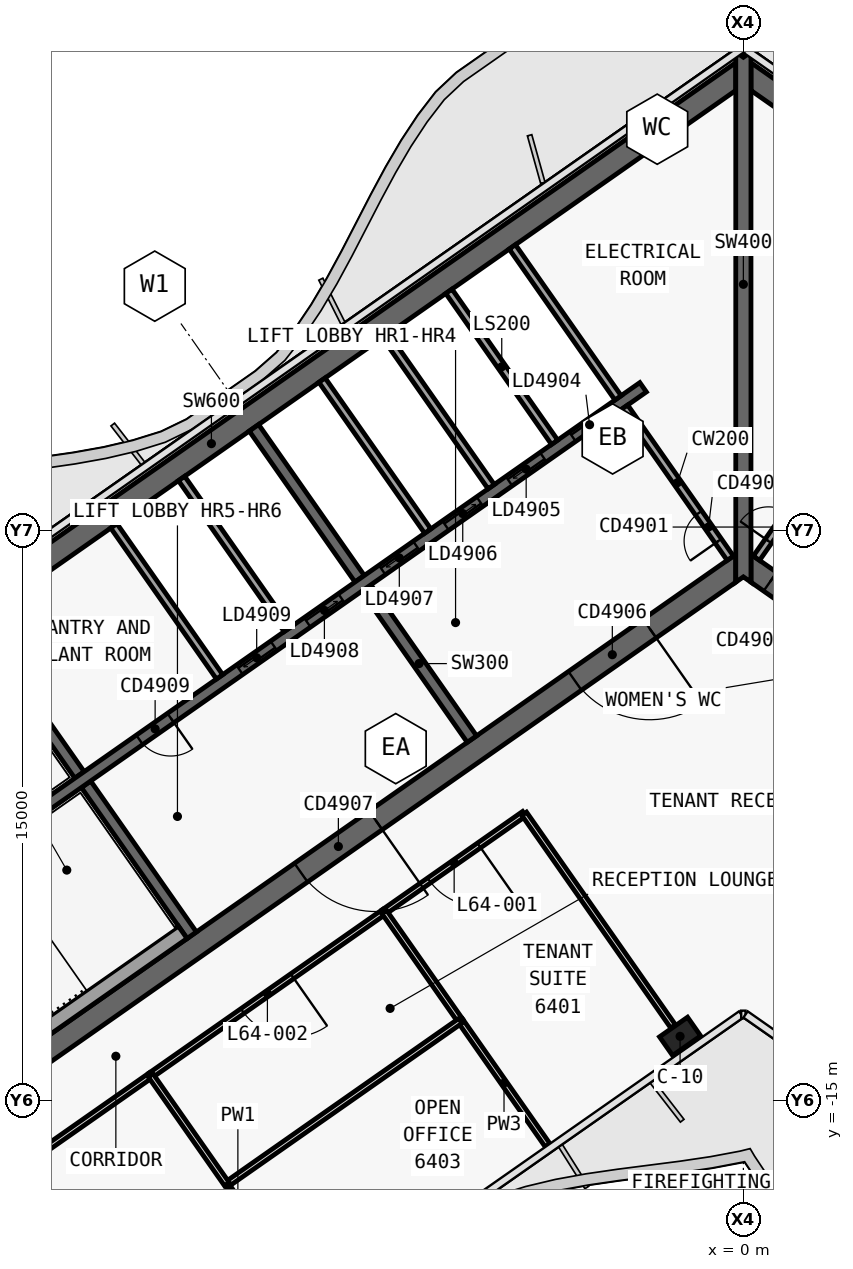
"""IFC4 building model, lengths in metres.
Left out: names, types, materials, properties, quantities, classifications, styles, units other than length and angle.
Written with IfcOpenShell. Run it as: python <this file> out.ifc"""

import sys

from ifc_helpers import new_model, si_unit, direction, frame, frame_2d, origin, origin_2d, place, context, subcontext, project, spatial, polyline, rectangle, outline, extrude, element, fill, save


model = new_model("IFC4")
c1 = context("Model", 3, precision=1e-05, world=origin(), true_north=direction((0.0, 1.0)))
c2 = subcontext(c1, "Body", "Model", "MODEL_VIEW")
j1 = project(units=[si_unit("LENGTHUNIT", "METRE"), si_unit("PLANEANGLEUNIT", "RADIAN")], contexts=[c1])
p1 = place(None, origin())
s1 = spatial("IfcSite", under=j1, at=p1, CompositionType="ELEMENT")
p2 = place(p1, origin())
s2 = spatial("IfcBuilding", under=s1, at=p2, CompositionType="ELEMENT")
p3 = place(p2, frame((0.0, 0.0, 272.2)))
s3 = spatial("IfcBuildingStorey", under=s2, at=p3, CompositionType="ELEMENT", Elevation=272.2)
p4 = place(p3, frame((-0.028, 12.066, 0.0), z_axis=(0.0, 0.0, 1.0), x_axis=(-0.819151382952, -0.573577380837, 0.0)))
e1 = element("IfcWall", 1, at=p4, inside=s3, PredefinedType="SHEAR", context=c2, shape_type="SweptSolid", body=[
    extrude(outline(polyline([(33.898, 0.3), (0.42, 0.3), (0.0, -0.3), (33.898, -0.3), (33.898, 0.3)])), origin(), (0.0, 0.0, 1.0), 3.9),
])
p5 = place(p3, frame((-0.028, -0.874, 0.0), z_axis=(0.0, 0.0, 1.0), x_axis=(-0.819150035022, -0.573579305871, 0.0)))
e2 = element("IfcWall", 2, at=p5, inside=s3, PredefinedType="SHEAR", context=c2, shape_type="SweptSolid", body=[
    extrude(outline(polyline([(26.476, 0.3), (0.42, 0.3), (0.0, -0.3), (26.476, -0.3), (26.476, 0.3)])), origin(), (0.0, 0.0, 1.0), 3.9),
])
p6 = place(p5, frame((2.976, 0.0, 0.0)))
e3 = element("IfcOpeningElement", 3, at=p6, cuts=e2, PredefinedType="OPENING", context=c2, shape_type="SweptSolid", body=[
    extrude(rectangle(XDim=2.4, YDim=2.1, at=frame_2d((1.2, 1.05))), frame((0.0, 0.31, 0.0), z_axis=(0.0, -1.0, 0.0), x_axis=(1.0, 0.0, 0.0)), (0.0, 0.0, 1.0), 0.62),
])
p7 = place(p5, frame((11.776, 0.0, 0.0)))
e4 = element("IfcOpeningElement", 4, at=p7, cuts=e2, PredefinedType="OPENING", context=c2, shape_type="SweptSolid", body=[
    extrude(rectangle(XDim=2.4, YDim=2.1, at=frame_2d((1.2, 1.05))), frame((0.0, 0.31, 0.0), z_axis=(0.0, -1.0, 0.0), x_axis=(1.0, 0.0, 0.0)), (0.0, 0.0, 1.0), 0.62),
])
p8 = place(p3, frame((-7.143, -5.49, 0.0), z_axis=(0.0, 0.0, 1.0), x_axis=(-0.573617744349, 0.819123118565, 0.0)))
e5 = element("IfcWall", 5, at=p8, inside=s3, PredefinedType="SHEAR", context=c2, shape_type="SweptSolid", body=[
    extrude(outline(polyline([(4.85, 0.15), (0.0, 0.15), (0.0, -0.15), (4.85, -0.15), (4.85, 0.15)])), origin(), (0.0, 0.0, 1.0), 3.9),
])
p9 = place(p3, frame((-10.097, -1.271, 0.0), z_axis=(0.0, 0.0, 1.0), x_axis=(-0.573560315113, 0.819163332265, 0.0)))
e6 = element("IfcWall", 6, at=p9, inside=s3, PredefinedType="SHEAR", context=c2, shape_type="SweptSolid", body=[
    extrude(outline(polyline([(4.85, -0.15), (4.85, 0.15), (0.0, 0.15), (0.0, -0.15), (4.85, -0.15)])), origin(), (0.0, 0.0, 1.0), 3.9),
])
p10 = place(p3, frame((-14.515, -10.652, 0.0), z_axis=(0.0, 0.0, 1.0), x_axis=(-0.573560315113, 0.819163332265, 0.0)))
e7 = element("IfcWall", 7, at=p10, inside=s3, PredefinedType="SHEAR", context=c2, shape_type="SweptSolid", body=[
    extrude(outline(polyline([(4.85, 0.15), (0.0, 0.15), (0.0, -0.15), (4.85, -0.15), (4.85, 0.15)])), origin(), (0.0, 0.0, 1.0), 3.9),
])
p11 = place(p3, frame((-17.469, -6.433, 0.0), z_axis=(0.0, 0.0, 1.0), x_axis=(-0.573594092424, 0.81913968109, 0.0)))
e8 = element("IfcWall", 8, at=p11, inside=s3, PredefinedType="SHEAR", context=c2, shape_type="SweptSolid", body=[
    extrude(outline(polyline([(4.85, -0.15), (4.85, 0.15), (0.0, 0.15), (0.0, -0.15), (4.85, -0.15)])), origin(), (0.0, 0.0, 1.0), 3.9),
])
p12 = place(p3, frame((-2.638, 3.768, 0.0), z_axis=(0.0, 0.0, 1.0), x_axis=(-0.819155014212, -0.573572194837, 0.0)))
e9 = element("IfcWall", 9, at=p12, inside=s3, PredefinedType="SHEAR", context=c2, shape_type="SweptSolid", body=[
    extrude(outline(polyline([(26.4, 0.15), (0.0, 0.15), (0.0, -0.15), (26.4, -0.15), (26.4, 0.15)])), origin(), (0.0, 0.0, 1.0), 3.9),
])
p13 = place(p12, frame((1.169, 0.0, 0.0)))
e10 = element("IfcOpeningElement", 10, at=p13, cuts=e9, PredefinedType="OPENING", context=c2, shape_type="SweptSolid", body=[
    extrude(rectangle(XDim=1.1, YDim=2.1, at=frame_2d((0.55, 1.05))), frame((0.0, 0.16, 0.0), z_axis=(0.0, -1.0, 0.0), x_axis=(1.0, 0.0, 0.0)), (0.0, 0.0, 1.0), 0.32),
])
p14 = place(p12, frame((3.206, 0.0, 0.0)))
e11 = element("IfcOpeningElement", 11, at=p14, cuts=e9, PredefinedType="OPENING", context=c2, shape_type="SweptSolid", body=[
    extrude(rectangle(XDim=1.1, YDim=2.1, at=frame_2d((0.55, 1.05))), frame((0.0, 0.16, 0.0), z_axis=(0.0, -1.0, 0.0), x_axis=(1.0, 0.0, 0.0)), (0.0, 0.0, 1.0), 0.32),
])
p15 = place(p12, frame((5.244, 0.0, 0.0)))
e12 = element("IfcOpeningElement", 12, at=p15, cuts=e9, PredefinedType="OPENING", context=c2, shape_type="SweptSolid", body=[
    extrude(rectangle(XDim=1.1, YDim=2.1, at=frame_2d((0.55, 1.05))), frame((0.0, 0.16, 0.0), z_axis=(0.0, -1.0, 0.0), x_axis=(1.0, 0.0, 0.0)), (0.0, 0.0, 1.0), 0.32),
])
p16 = place(p12, frame((7.281, 0.0, 0.0)))
e13 = element("IfcOpeningElement", 13, at=p16, cuts=e9, PredefinedType="OPENING", context=c2, shape_type="SweptSolid", body=[
    extrude(rectangle(XDim=1.1, YDim=2.1, at=frame_2d((0.55, 1.05))), frame((0.0, 0.16, 0.0), z_axis=(0.0, -1.0, 0.0), x_axis=(1.0, 0.0, 0.0)), (0.0, 0.0, 1.0), 0.32),
])
p17 = place(p12, frame((9.688, 0.0, 0.0)))
e14 = element("IfcOpeningElement", 14, at=p17, cuts=e9, PredefinedType="OPENING", context=c2, shape_type="SweptSolid", body=[
    extrude(rectangle(XDim=1.1, YDim=2.1, at=frame_2d((0.55, 1.05))), frame((0.0, 0.16, 0.0), z_axis=(0.0, -1.0, 0.0), x_axis=(1.0, 0.0, 0.0)), (0.0, 0.0, 1.0), 0.32),
])
p18 = place(p12, frame((11.863, 0.0, 0.0)))
e15 = element("IfcOpeningElement", 15, at=p18, cuts=e9, PredefinedType="OPENING", context=c2, shape_type="SweptSolid", body=[
    extrude(rectangle(XDim=1.1, YDim=2.1, at=frame_2d((0.55, 1.05))), frame((0.0, 0.16, 0.0), z_axis=(0.0, -1.0, 0.0), x_axis=(1.0, 0.0, 0.0)), (0.0, 0.0, 1.0), 0.32),
])
p19 = place(p12, frame((15.175, 0.0, 0.0)))
e16 = element("IfcOpeningElement", 16, at=p19, cuts=e9, PredefinedType="OPENING", context=c2, shape_type="SweptSolid", body=[
    extrude(rectangle(XDim=1.0, YDim=2.1, at=frame_2d((0.5, 1.05))), frame((0.0, 0.16, 0.0), z_axis=(0.0, -1.0, 0.0), x_axis=(1.0, 0.0, 0.0)), (0.0, 0.0, 1.0), 0.32),
])
p20 = place(p3, frame((0.028, 12.066, 0.0), z_axis=(0.0, 0.0, 1.0), x_axis=(0.819151382952, -0.573577380837, 0.0)))
e17 = element("IfcWall", 17, at=p20, inside=s3, PredefinedType="SHEAR", context=c2, shape_type="SweptSolid", body=[
    extrude(outline(polyline([(33.898, 0.3), (0.0, 0.3), (0.42, -0.3), (33.898, -0.3), (33.898, 0.3)])), origin(), (0.0, 0.0, 1.0), 3.9),
])
p21 = place(p3, frame((0.028, -0.874, 0.0), z_axis=(0.0, 0.0, 1.0), x_axis=(0.819150035022, -0.573579305871, 0.0)))
e18 = element("IfcWall", 18, at=p21, inside=s3, PredefinedType="SHEAR", context=c2, shape_type="SweptSolid", body=[
    extrude(outline(polyline([(26.476, 0.3), (0.0, 0.3), (0.42, -0.3), (26.476, -0.3), (26.476, 0.3)])), origin(), (0.0, 0.0, 1.0), 3.9),
])
p22 = place(p21, frame((0.826, 0.0, 0.0)))
e19 = element("IfcOpeningElement", 19, at=p22, cuts=e18, PredefinedType="OPENING", context=c2, shape_type="SweptSolid", body=[
    extrude(rectangle(XDim=1.5, YDim=2.1, at=frame_2d((0.75, 1.05))), frame((0.0, 0.31, 0.0), z_axis=(0.0, -1.0, 0.0), x_axis=(1.0, 0.0, 0.0)), (0.0, 0.0, 1.0), 0.62),
])
p23 = place(p21, frame((12.226, 0.0, 0.0)))
e20 = element("IfcOpeningElement", 20, at=p23, cuts=e18, PredefinedType="OPENING", context=c2, shape_type="SweptSolid", body=[
    extrude(rectangle(XDim=1.5, YDim=2.1, at=frame_2d((0.75, 1.05))), frame((0.0, 0.31, 0.0), z_axis=(0.0, -1.0, 0.0), x_axis=(1.0, 0.0, 0.0)), (0.0, 0.0, 1.0), 0.62),
])
p24 = place(p3, frame((0.0, -1.361, 0.0), z_axis=(0.0, 0.0, 1.0), x_axis=(0.0, 1.0, 0.0)))
e21 = element("IfcWall", 21, at=p24, inside=s3, PredefinedType="SHEAR", context=c2, shape_type="SweptSolid", body=[
    extrude(outline(polyline([(0.14, 0.2), (0.0, 0.2), (0.14, 0.0), (0.0, -0.2), (0.14, -0.2), (1.012, -0.2), (12.94, -0.2), (13.813, -0.2), (13.893, -0.2), (13.933, -0.172), (13.813, 0.0), (13.933, 0.172), (13.893, 0.2), (13.813, 0.2), (12.94, 0.2), (1.012, 0.2), (0.14, 0.2)])), origin(), (0.0, 0.0, 1.0), 3.9),
])
p25 = place(p3, frame((-1.665, -13.313, 0.0), z_axis=(0.0, 0.0, 1.0), x_axis=(-0.819152044289, -0.573576436351, 0.0)))
e22 = element("IfcColumn", 22, at=p25, inside=s3, PredefinedType="COLUMN", context=c2, shape_type="SweptSolid", body=[
    extrude(rectangle(XDim=0.9, YDim=0.6, at=origin_2d()), origin(), (0.0, 0.0, 1.0), 3.9),
])
p26 = place(p3, frame((-4.967, 2.321, 0.0), z_axis=(0.0, 0.0, 1.0), x_axis=(-0.573594092424, 0.81913968109, 0.0)))
e23 = element("IfcWall", 23, at=p26, inside=s3, PredefinedType="SOLIDWALL", context=c2, shape_type="SweptSolid", body=[
    extrude(rectangle(XDim=4.85, YDim=0.2, at=frame_2d((2.425, 0.0))), origin(), (0.0, 0.0, 1.0), 3.9),
])
p27 = place(p3, frame((-6.636, 1.152, 0.0), z_axis=(0.0, 0.0, 1.0), x_axis=(-0.573560315113, 0.819163332265, 0.0)))
e24 = element("IfcWall", 24, at=p27, inside=s3, PredefinedType="SOLIDWALL", context=c2, shape_type="SweptSolid", body=[
    extrude(rectangle(XDim=4.85, YDim=0.2, at=frame_2d((2.425, 0.0))), origin(), (0.0, 0.0, 1.0), 3.9),
])
p28 = place(p3, frame((-8.305, -0.017, 0.0), z_axis=(0.0, 0.0, 1.0), x_axis=(-0.573594092424, 0.81913968109, 0.0)))
e25 = element("IfcWall", 25, at=p28, inside=s3, PredefinedType="SOLIDWALL", context=c2, shape_type="SweptSolid", body=[
    extrude(rectangle(XDim=4.85, YDim=0.2, at=frame_2d((2.425, 0.0))), origin(), (0.0, 0.0, 1.0), 3.9),
])
p29 = place(p3, frame((-12.001, -2.605, 0.0), z_axis=(0.0, 0.0, 1.0), x_axis=(-0.573560315113, 0.819163332265, 0.0)))
e26 = element("IfcWall", 26, at=p29, inside=s3, PredefinedType="SOLIDWALL", context=c2, shape_type="SweptSolid", body=[
    extrude(rectangle(XDim=4.85, YDim=0.2, at=frame_2d((2.425, 0.0))), origin(), (0.0, 0.0, 1.0), 3.9),
])
p30 = place(p3, frame((-13.783, -3.852, 0.0), z_axis=(0.0, 0.0, 1.0), x_axis=(-0.573594092424, 0.81913968109, 0.0)))
e27 = element("IfcWall", 27, at=p30, inside=s3, PredefinedType="SOLIDWALL", context=c2, shape_type="SweptSolid", body=[
    extrude(rectangle(XDim=4.85, YDim=0.2, at=frame_2d((2.425, 0.0))), origin(), (0.0, 0.0, 1.0), 3.9),
])
p31 = place(p3, frame((-14.753, -10.574, 0.0), z_axis=(0.0, 0.0, 1.0), x_axis=(-0.819158229677, -0.573567602601, 0.0)))
e28 = element("IfcWall", 28, at=p31, inside=s3, PredefinedType="SOLIDWALL", context=c2, shape_type="SweptSolid", body=[
    extrude(rectangle(XDim=8.25, YDim=0.4, at=frame_2d((4.125, 0.0))), origin(), (0.0, 0.0, 1.0), 3.62),
])
p32 = place(p3, frame((-0.344, -0.729, 0.0), z_axis=(0.0, 0.0, 1.0), x_axis=(-0.573560315113, 0.819163332265, 0.0)))
e29 = element("IfcWall", 29, at=p32, inside=s3, PredefinedType="SOLIDWALL", context=c2, shape_type="SweptSolid", body=[
    extrude(rectangle(XDim=4.85, YDim=0.2, at=frame_2d((2.425, 0.0))), origin(), (0.0, 0.0, 1.0), 3.62),
])
p33 = place(p32, frame((0.55, 0.0, 0.0)))
e30 = element("IfcOpeningElement", 30, at=p33, cuts=e29, PredefinedType="OPENING", context=c2, shape_type="SweptSolid", body=[
    extrude(rectangle(XDim=0.9, YDim=2.1, at=frame_2d((0.45, 1.05))), frame((0.0, 0.11, 0.0), z_axis=(0.0, -1.0, 0.0), x_axis=(1.0, 0.0, 0.0)), (0.0, 0.0, 1.0), 0.22),
])
p34 = place(p3, frame((-3.298, 3.49, 0.0), z_axis=(0.0, 0.0, 1.0), x_axis=(-0.573560315113, 0.819163332265, 0.0)))
e31 = element("IfcWall", 31, at=p34, inside=s3, PredefinedType="SOLIDWALL", context=c2, shape_type="SweptSolid", body=[
    extrude(rectangle(XDim=4.85, YDim=0.2, at=frame_2d((2.425, 0.0))), origin(), (0.0, 0.0, 1.0), 3.62),
])
p35 = place(p3, frame((0.344, -0.729, 0.0), z_axis=(0.0, 0.0, 1.0), x_axis=(0.573560315113, 0.819163332265, 0.0)))
e32 = element("IfcWall", 32, at=p35, inside=s3, PredefinedType="SOLIDWALL", context=c2, shape_type="SweptSolid", body=[
    extrude(rectangle(XDim=4.85, YDim=0.2, at=frame_2d((2.425, 0.0))), origin(), (0.0, 0.0, 1.0), 3.62),
])
p36 = place(p35, frame((0.55, 0.0, 0.0)))
e33 = element("IfcOpeningElement", 33, at=p36, cuts=e32, PredefinedType="OPENING", context=c2, shape_type="SweptSolid", body=[
    extrude(rectangle(XDim=0.9, YDim=2.1, at=frame_2d((0.45, 1.05))), frame((0.0, 0.11, 0.0), z_axis=(0.0, -1.0, 0.0), x_axis=(1.0, 0.0, 0.0)), (0.0, 0.0, 1.0), 0.22),
])
p37 = place(p3, frame((-5.766, -7.456, 0.0), z_axis=(0.0, 0.0, 1.0), x_axis=(-0.819142740634, -0.573589723117, 0.0)))
e34 = element("IfcWall", 34, at=p37, inside=s3, PredefinedType="PARTITIONING", context=c2, shape_type="SweptSolid", body=[
    extrude(rectangle(XDim=4.502, YDim=0.15, at=frame_2d((2.251, 0.0))), origin(), (0.0, 0.0, 1.0), 3.05),
])
p38 = place(p37, frame((1.451, 0.0, 0.0)))
e35 = element("IfcOpeningElement", 35, at=p38, cuts=e34, PredefinedType="OPENING", context=c2, shape_type="SweptSolid", body=[
    extrude(rectangle(XDim=1.6, YDim=2.1, at=frame_2d((0.8, 1.05))), frame((0.0, 0.085, 0.0), z_axis=(0.0, -1.0, 0.0), x_axis=(1.0, 0.0, 0.0)), (0.0, 0.0, 1.0), 0.17),
])
p39 = place(p3, frame((-9.451, -10.036, 0.0), z_axis=(0.0, 0.0, 1.0), x_axis=(-0.819164661457, -0.573558416746, 0.0)))
e36 = element("IfcWall", 36, at=p39, inside=s3, PredefinedType="PARTITIONING", context=c2, shape_type="SweptSolid", body=[
    extrude(rectangle(XDim=7.504, YDim=0.15, at=frame_2d((3.752, 0.0))), origin(), (0.0, 0.0, 1.0), 3.05),
])
p40 = place(p39, frame((2.952, 0.0, 0.0)))
e37 = element("IfcOpeningElement", 37, at=p40, cuts=e36, PredefinedType="OPENING", context=c2, shape_type="SweptSolid", body=[
    extrude(rectangle(XDim=1.6, YDim=2.1, at=frame_2d((0.8, 1.05))), frame((0.0, 0.085, 0.0), z_axis=(0.0, -1.0, 0.0), x_axis=(1.0, 0.0, 0.0)), (0.0, 0.0, 1.0), 0.17),
])
p41 = place(p3, frame((-15.594, -14.338, 0.0), z_axis=(0.0, 0.0, 1.0), x_axis=(-0.819154519377, -0.573572901543, 0.0)))
e38 = element("IfcWall", 38, at=p41, inside=s3, PredefinedType="PARTITIONING", context=c2, shape_type="SweptSolid", body=[
    extrude(rectangle(XDim=12.004, YDim=0.15, at=frame_2d((6.002, 0.0))), origin(), (0.0, 0.0, 1.0), 3.05),
])
p42 = place(p41, frame((5.202, 0.0, 0.0)))
e39 = element("IfcOpeningElement", 39, at=p42, cuts=e38, PredefinedType="OPENING", context=c2, shape_type="SweptSolid", body=[
    extrude(rectangle(XDim=1.6, YDim=2.1, at=frame_2d((0.8, 1.05))), frame((0.0, 0.085, 0.0), z_axis=(0.0, -1.0, 0.0), x_axis=(1.0, 0.0, 0.0)), (0.0, 0.0, 1.0), 0.17),
])
p43 = place(p3, frame((-1.849, -13.051, 0.0), z_axis=(0.0, 0.0, 1.0), x_axis=(-0.57357985571, 0.819149650018, 0.0)))
e40 = element("IfcWall", 40, at=p43, inside=s3, PredefinedType="PARTITIONING", context=c2, shape_type="SweptSolid", body=[
    extrude(rectangle(XDim=6.832, YDim=0.15, at=frame_2d((3.416, 0.0))), origin(), (0.0, 0.0, 1.0), 3.05),
])
p44 = place(p3, frame((-7.444, -12.906, 0.0), z_axis=(0.0, 0.0, 1.0), x_axis=(-0.573555919535, 0.819166409935, 0.0)))
e41 = element("IfcWall", 41, at=p44, inside=s3, PredefinedType="PARTITIONING", context=c2, shape_type="SweptSolid", body=[
    extrude(rectangle(XDim=3.502, YDim=0.15, at=frame_2d((1.751, 0.0))), origin(), (0.0, 0.0, 1.0), 3.62),
])
p45 = place(p3, frame((-5.151, -16.18, 0.0), z_axis=(0.0, 0.0, 1.0), x_axis=(-0.573593387921, 0.81914017441, 0.0)))
e42 = element("IfcWall", 42, at=p45, inside=s3, PredefinedType="PARTITIONING", context=c2, shape_type="SweptSolid", body=[
    extrude(rectangle(XDim=4.001, YDim=0.15, at=frame_2d((2.0, 0.0))), origin(), (0.0, 0.0, 1.0), 3.0),
])
p46 = place(p3, frame((-7.445, -12.904, 0.0), z_axis=(0.0, 0.0, 1.0), x_axis=(-0.819137093595, -0.573597787563, 0.0)))
e43 = element("IfcWall", 43, at=p46, inside=s3, PredefinedType="PARTITIONING", context=c2, shape_type="SweptSolid", body=[
    extrude(rectangle(XDim=7.5, YDim=0.15, at=frame_2d((3.75, 0.0))), origin(), (0.0, 0.0, 1.0), 3.05),
])
p47 = place(p3, frame((-13.589, -17.206, 0.0), z_axis=(0.0, 0.0, 1.0), x_axis=(-0.573565328398, 0.819159822049, 0.0)))
e44 = element("IfcWall", 44, at=p47, inside=s3, PredefinedType="PARTITIONING", context=c2, shape_type="SweptSolid", body=[
    extrude(rectangle(XDim=3.5, YDim=0.15, at=frame_2d((1.75, 0.0))), origin(), (0.0, 0.0, 1.0), 3.62),
])
p48 = place(p3, frame((-13.588, -17.207, 0.0), z_axis=(0.0, 0.0, 1.0), x_axis=(0.573708088123, -0.819059844958, 0.0)))
e45 = element("IfcWall", 45, at=p48, inside=s3, PredefinedType="PARTITIONING", context=c2, shape_type="SweptSolid", body=[
    extrude(rectangle(XDim=1.0, YDim=0.1, at=frame_2d((0.5, 0.0))), origin(), (0.0, 0.0, 1.0), 3.62),
])
p49 = place(p13, origin())
e46 = element("IfcDoor", 46, at=p49, inside=s3, OperationType="SLIDING_TO_LEFT", PredefinedType="DOOR", context=c2, shape_type="SweptSolid", body=[
    extrude(rectangle(XDim=1.1, YDim=2.1, at=frame_2d((0.55, 1.05))), frame((0.0, 0.025, 0.0), z_axis=(0.0, -1.0, 0.0), x_axis=(1.0, 0.0, 0.0)), (0.0, 0.0, 1.0), 0.05),
])
fill(e10, e46)
p50 = place(p14, origin())
e47 = element("IfcDoor", 47, at=p50, inside=s3, OperationType="SLIDING_TO_RIGHT", PredefinedType="DOOR", context=c2, shape_type="SweptSolid", body=[
    extrude(rectangle(XDim=1.1, YDim=2.1, at=frame_2d((0.55, 1.05))), frame((0.0, 0.025, 0.0), z_axis=(0.0, -1.0, 0.0), x_axis=(1.0, 0.0, 0.0)), (0.0, 0.0, 1.0), 0.05),
])
fill(e11, e47)
p51 = place(p15, origin())
e48 = element("IfcDoor", 48, at=p51, inside=s3, OperationType="SLIDING_TO_LEFT", PredefinedType="DOOR", context=c2, shape_type="SweptSolid", body=[
    extrude(rectangle(XDim=1.1, YDim=2.1, at=frame_2d((0.55, 1.05))), frame((0.0, 0.025, 0.0), z_axis=(0.0, -1.0, 0.0), x_axis=(1.0, 0.0, 0.0)), (0.0, 0.0, 1.0), 0.05),
])
fill(e12, e48)
p52 = place(p16, origin())
e49 = element("IfcDoor", 49, at=p52, inside=s3, OperationType="SLIDING_TO_RIGHT", PredefinedType="DOOR", context=c2, shape_type="SweptSolid", body=[
    extrude(rectangle(XDim=1.1, YDim=2.1, at=frame_2d((0.55, 1.05))), frame((0.0, 0.025, 0.0), z_axis=(0.0, -1.0, 0.0), x_axis=(1.0, 0.0, 0.0)), (0.0, 0.0, 1.0), 0.05),
])
fill(e13, e49)
p53 = place(p17, origin())
e50 = element("IfcDoor", 50, at=p53, inside=s3, OperationType="SLIDING_TO_LEFT", PredefinedType="DOOR", context=c2, shape_type="SweptSolid", body=[
    extrude(rectangle(XDim=1.1, YDim=2.1, at=frame_2d((0.55, 1.05))), frame((0.0, 0.025, 0.0), z_axis=(0.0, -1.0, 0.0), x_axis=(1.0, 0.0, 0.0)), (0.0, 0.0, 1.0), 0.05),
])
fill(e14, e50)
p54 = place(p18, origin())
e51 = element("IfcDoor", 51, at=p54, inside=s3, OperationType="SLIDING_TO_RIGHT", PredefinedType="DOOR", context=c2, shape_type="SweptSolid", body=[
    extrude(rectangle(XDim=1.1, YDim=2.1, at=frame_2d((0.55, 1.05))), frame((0.0, 0.025, 0.0), z_axis=(0.0, -1.0, 0.0), x_axis=(1.0, 0.0, 0.0)), (0.0, 0.0, 1.0), 0.05),
])
fill(e15, e51)
p55 = place(p19, origin())
e52 = element("IfcDoor", 52, at=p55, inside=s3, OperationType="SINGLE_SWING_RIGHT", PredefinedType="DOOR", context=c2, shape_type="SweptSolid", body=[
    extrude(rectangle(XDim=1.0, YDim=2.1, at=frame_2d((0.5, 1.05))), frame((0.0, 0.025, 0.0), z_axis=(0.0, -1.0, 0.0), x_axis=(1.0, 0.0, 0.0)), (0.0, 0.0, 1.0), 0.05),
])
fill(e16, e52)
p56 = place(p6, origin())
e53 = element("IfcDoor", 53, at=p56, inside=s3, OperationType="DOUBLE_DOOR_SINGLE_SWING", PredefinedType="DOOR", context=c2, shape_type="SweptSolid", body=[
    extrude(rectangle(XDim=2.4, YDim=2.1, at=frame_2d((1.2, 1.05))), frame((0.0, 0.025, 0.0), z_axis=(0.0, -1.0, 0.0), x_axis=(1.0, 0.0, 0.0)), (0.0, 0.0, 1.0), 0.05),
])
fill(e3, e53)
p57 = place(p7, origin())
e54 = element("IfcDoor", 54, at=p57, inside=s3, OperationType="DOUBLE_DOOR_SINGLE_SWING", PredefinedType="DOOR", context=c2, shape_type="SweptSolid", body=[
    extrude(rectangle(XDim=2.4, YDim=2.1, at=frame_2d((1.2, 1.05))), frame((0.0, 0.025, 0.0), z_axis=(0.0, -1.0, 0.0), x_axis=(1.0, 0.0, 0.0)), (0.0, 0.0, 1.0), 0.05),
])
fill(e4, e54)
p58 = place(p22, origin())
e55 = element("IfcDoor", 55, at=p58, inside=s3, OperationType="SINGLE_SWING_RIGHT", PredefinedType="DOOR", context=c2, shape_type="SweptSolid", body=[
    extrude(rectangle(XDim=1.5, YDim=2.1, at=frame_2d((0.75, 1.05))), frame((0.0, 0.025, 0.0), z_axis=(0.0, -1.0, 0.0), x_axis=(1.0, 0.0, 0.0)), (0.0, 0.0, 1.0), 0.05),
])
fill(e19, e55)
p59 = place(p33, origin())
e56 = element("IfcDoor", 56, at=p59, inside=s3, OperationType="SINGLE_SWING_RIGHT", PredefinedType="DOOR", context=c2, shape_type="SweptSolid", body=[
    extrude(rectangle(XDim=0.9, YDim=2.1, at=frame_2d((0.45, 1.05))), frame((0.0, 0.025, 0.0), z_axis=(0.0, -1.0, 0.0), x_axis=(1.0, 0.0, 0.0)), (0.0, 0.0, 1.0), 0.05),
])
fill(e30, e56)
p60 = place(p36, origin())
e57 = element("IfcDoor", 57, at=p60, inside=s3, OperationType="SINGLE_SWING_RIGHT", PredefinedType="DOOR", context=c2, shape_type="SweptSolid", body=[
    extrude(rectangle(XDim=0.9, YDim=2.1, at=frame_2d((0.45, 1.05))), frame((0.0, 0.025, 0.0), z_axis=(0.0, -1.0, 0.0), x_axis=(1.0, 0.0, 0.0)), (0.0, 0.0, 1.0), 0.05),
])
fill(e33, e57)
p61 = place(p38, origin())
e58 = element("IfcDoor", 58, at=p61, inside=s3, OperationType="DOUBLE_DOOR_SINGLE_SWING", PredefinedType="DOOR", context=c2, shape_type="SweptSolid", body=[
    extrude(rectangle(XDim=1.6, YDim=2.1, at=frame_2d((0.8, 1.05))), frame((0.0, 0.025, 0.0), z_axis=(0.0, -1.0, 0.0), x_axis=(1.0, 0.0, 0.0)), (0.0, 0.0, 1.0), 0.05),
])
fill(e35, e58)
p62 = place(p40, origin())
e59 = element("IfcDoor", 59, at=p62, inside=s3, OperationType="DOUBLE_DOOR_SINGLE_SWING", PredefinedType="DOOR", context=c2, shape_type="SweptSolid", body=[
    extrude(rectangle(XDim=1.6, YDim=2.1, at=frame_2d((0.8, 1.05))), frame((0.0, 0.025, 0.0), z_axis=(0.0, -1.0, 0.0), x_axis=(1.0, 0.0, 0.0)), (0.0, 0.0, 1.0), 0.05),
])
fill(e37, e59)
save(model, sys.argv[1])
